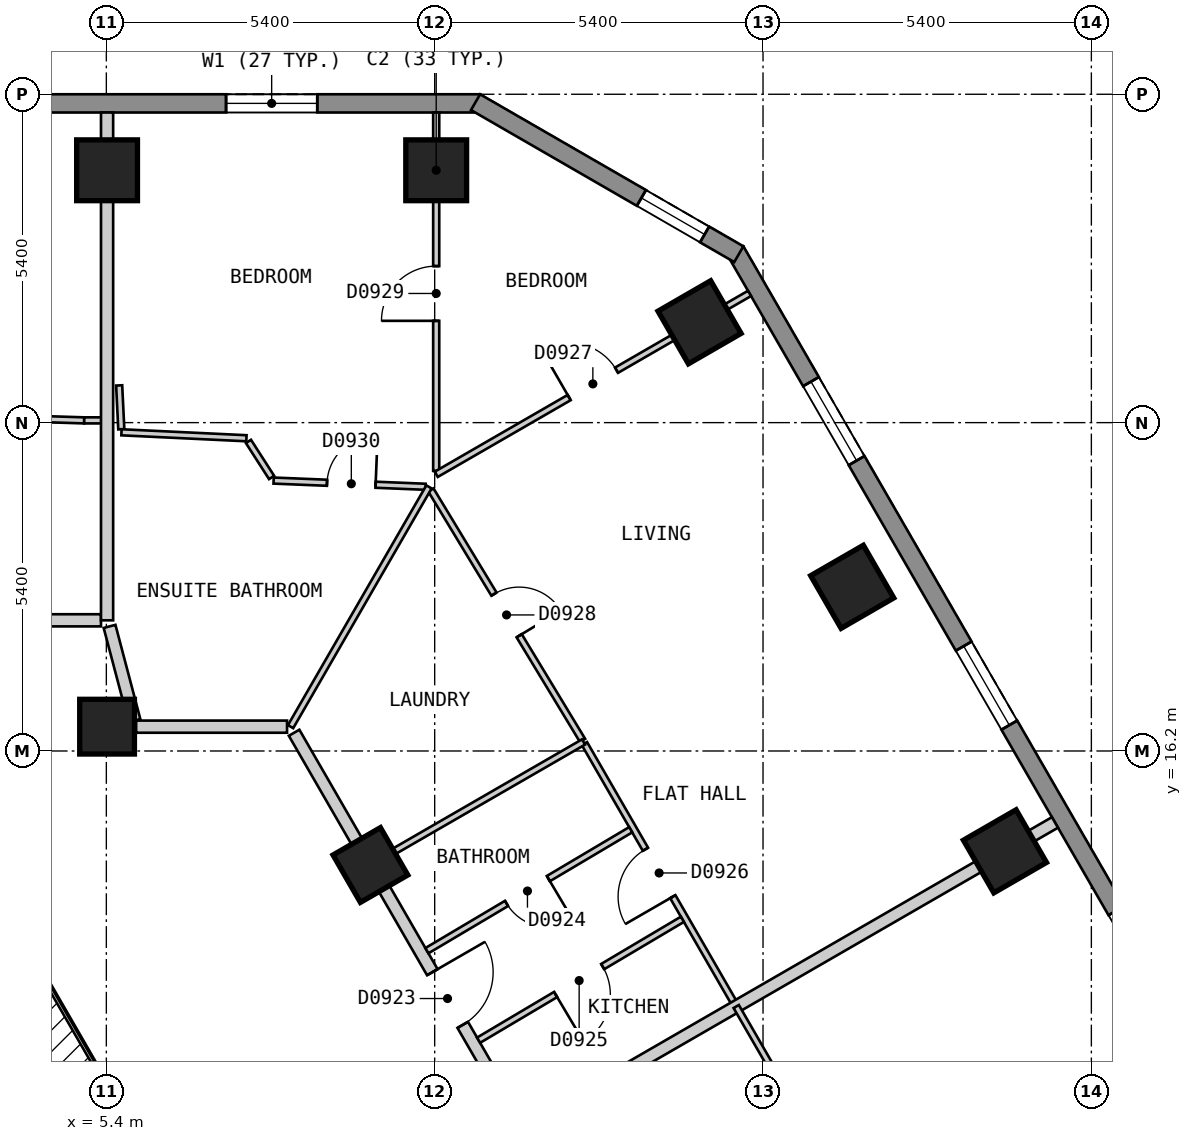
"""IFC4 building model, lengths in metres.
Left out: names, types, materials, properties, quantities, classifications, styles, units other than length and angle.
Written with IfcOpenShell. Run it as: python <this file> out.ifc"""

import sys

from ifc_helpers import new_model, si_unit, direction, frame, frame_2d, origin, origin_2d, place, context, subcontext, project, spatial, polyline, rectangle, outline, extrude, element, fill, save


model = new_model("IFC4")
c1 = context("Model", 3, precision=1e-05, world=origin(), true_north=direction((0.0, 1.0)))
c2 = subcontext(c1, "Body", "Model", "MODEL_VIEW")
j1 = project(units=[si_unit("LENGTHUNIT", "METRE"), si_unit("PLANEANGLEUNIT", "RADIAN")], contexts=[c1])
p1 = place(None, origin())
s1 = spatial("IfcSite", under=j1, at=p1, CompositionType="ELEMENT")
p2 = place(p1, origin())
s2 = spatial("IfcBuilding", under=s1, at=p2, CompositionType="ELEMENT")
p3 = place(p2, frame((0.0, 0.0, 90.0)))
s3 = spatial("IfcBuildingStorey", under=s2, at=p3, CompositionType="ELEMENT", Elevation=90.0)
for number, where, z_axis, x_axis in (
    (1, (10.825, 25.75, 0.0), (0.0, 0.0, 1.0), (-1.0, 0.0, 0.0)),
    (2, (5.412, 25.75, 0.0), (0.0, 0.0, 1.0), (-1.0, 0.0, 0.0)),
    (3, (20.179, 14.55, 0.0), (0.0, 0.0, 1.0), (-0.5, 0.866, 0.0)),
    (4, (17.667, 18.9, 0.0), (0.0, 0.0, 1.0), (-0.5, 0.866, 0.0)),
    (5, (15.156, 23.25, 0.0), (0.0, 0.0, 1.0), (-0.5, 0.866, 0.0)),
):
    element("IfcColumn", number, at=place(p3, frame(where, z_axis=z_axis, x_axis=x_axis)), inside=s3, PredefinedType="COLUMN", context=c2, shape_type="SweptSolid", body=[
        extrude(rectangle(XDim=1.0, YDim=1.0, at=origin_2d()), origin(), (0.0, 0.0, 1.0), 3.0),
    ])
for number, where, z_axis, x_axis in (
    (6, (9.743, 14.325, 0.0), (0.0, 0.0, 1.0), (-0.5, 0.866, 0.0)),
    (7, (5.412, 16.6, 0.0), (0.0, 0.0, 1.0), (-1.0, 0.0, 0.0)),
):
    element("IfcColumn", number, at=place(p3, frame(where, z_axis=z_axis, x_axis=x_axis)), inside=s3, PredefinedType="COLUMN", context=c2, shape_type="SweptSolid", body=[
        extrude(rectangle(XDim=0.9, YDim=0.9, at=origin_2d()), origin(), (0.0, 0.0, 1.0), 3.0),
    ])
p4 = place(p3, frame((11.547, 26.85, 0.0), z_axis=(0.0, 0.0, 1.0), x_axis=(-1.0, 0.0, 0.0)))
e8 = element("IfcWall", 8, at=p4, inside=s3, PredefinedType="SOLIDWALL", context=c2, shape_type="SweptSolid", body=[
    extrude(outline(polyline([(0.0, -0.15), (23.094, -0.15), (23.014, 0.15), (0.08, 0.15), (0.0, -0.15)])), origin(), (0.0, 0.0, 1.0), 2.7),
])
p5 = place(p4, frame((2.678, 0.0, 0.15)))
e9 = element("IfcOpeningElement", 9, at=p5, cuts=e8, PredefinedType="OPENING", context=c2, shape_type="SweptSolid", body=[
    extrude(rectangle(XDim=1.5, YDim=2.1, at=frame_2d((0.75, 1.05))), frame((0.0, 0.16, 0.0), z_axis=(0.0, -1.0, 0.0), x_axis=(1.0, 0.0, 0.0)), (0.0, 0.0, 1.0), 0.32),
])
p6 = place(p4, frame((8.092, 0.0, 0.15)))
e10 = element("IfcOpeningElement", 10, at=p6, cuts=e8, PredefinedType="OPENING", context=c2, shape_type="SweptSolid", body=[
    extrude(rectangle(XDim=1.5, YDim=2.1, at=frame_2d((0.75, 1.05))), frame((0.0, 0.16, 0.0), z_axis=(0.0, -1.0, 0.0), x_axis=(1.0, 0.0, 0.0)), (0.0, 0.0, 1.0), 0.32),
])
p7 = place(p4, frame((13.504, 0.0, 0.15)))
e11 = element("IfcOpeningElement", 11, at=p7, cuts=e8, PredefinedType="OPENING", context=c2, shape_type="SweptSolid", body=[
    extrude(rectangle(XDim=1.5, YDim=2.1, at=frame_2d((0.75, 1.05))), frame((0.0, 0.16, 0.0), z_axis=(0.0, -1.0, 0.0), x_axis=(1.0, 0.0, 0.0)), (0.0, 0.0, 1.0), 0.32),
])
p8 = place(p4, frame((18.917, 0.0, 0.15)))
e12 = element("IfcOpeningElement", 12, at=p8, cuts=e8, PredefinedType="OPENING", context=c2, shape_type="SweptSolid", body=[
    extrude(rectangle(XDim=1.5, YDim=2.1, at=frame_2d((0.75, 1.05))), frame((0.0, 0.16, 0.0), z_axis=(0.0, -1.0, 0.0), x_axis=(1.0, 0.0, 0.0)), (0.0, 0.0, 1.0), 0.32),
])
p9 = place(p3, frame((29.027, 1.425, 0.0), z_axis=(0.0, 0.0, 1.0), x_axis=(-0.500027479704, 0.866009537788, 0.0)))
e13 = element("IfcWall", 13, at=p9, inside=s3, PredefinedType="SOLIDWALL", context=c2, shape_type="SweptSolid", body=[
    extrude(outline(polyline([(0.0, -0.15), (26.559, -0.15), (26.478, 0.15), (0.08, 0.15), (0.0, -0.15)])), origin(), (0.0, 0.0, 1.0), 2.7),
])
p10 = place(p9, frame((2.483, 0.0, 0.15)))
e14 = element("IfcOpeningElement", 14, at=p10, cuts=e13, PredefinedType="OPENING", context=c2, shape_type="SweptSolid", body=[
    extrude(rectangle(XDim=1.5, YDim=2.1, at=frame_2d((0.75, 1.05))), frame((0.0, 0.16, 0.0), z_axis=(0.0, -1.0, 0.0), x_axis=(1.0, 0.0, 0.0)), (0.0, 0.0, 1.0), 0.32),
])
p11 = place(p9, frame((7.506, 0.0, 0.15)))
e15 = element("IfcOpeningElement", 15, at=p11, cuts=e13, PredefinedType="OPENING", context=c2, shape_type="SweptSolid", body=[
    extrude(rectangle(XDim=1.5, YDim=2.1, at=frame_2d((0.75, 1.05))), frame((0.0, 0.16, 0.0), z_axis=(0.0, -1.0, 0.0), x_axis=(1.0, 0.0, 0.0)), (0.0, 0.0, 1.0), 0.32),
])
p12 = place(p9, frame((12.529, 0.0, 0.15)))
e16 = element("IfcOpeningElement", 16, at=p12, cuts=e13, PredefinedType="OPENING", context=c2, shape_type="SweptSolid", body=[
    extrude(rectangle(XDim=1.5, YDim=2.1, at=frame_2d((0.75, 1.05))), frame((0.0, 0.16, 0.0), z_axis=(0.0, -1.0, 0.0), x_axis=(1.0, 0.0, 0.0)), (0.0, 0.0, 1.0), 0.32),
])
p13 = place(p9, frame((17.552, 0.0, 0.15)))
e17 = element("IfcOpeningElement", 17, at=p13, cuts=e13, PredefinedType="OPENING", context=c2, shape_type="SweptSolid", body=[
    extrude(rectangle(XDim=1.5, YDim=2.1, at=frame_2d((0.75, 1.05))), frame((0.0, 0.16, 0.0), z_axis=(0.0, -1.0, 0.0), x_axis=(1.0, 0.0, 0.0)), (0.0, 0.0, 1.0), 0.32),
])
p14 = place(p9, frame((22.575, 0.0, 0.15)))
e18 = element("IfcOpeningElement", 18, at=p14, cuts=e13, PredefinedType="OPENING", context=c2, shape_type="SweptSolid", body=[
    extrude(rectangle(XDim=1.5, YDim=2.1, at=frame_2d((0.75, 1.05))), frame((0.0, 0.16, 0.0), z_axis=(0.0, -1.0, 0.0), x_axis=(1.0, 0.0, 0.0)), (0.0, 0.0, 1.0), 0.32),
])
p15 = place(p3, frame((15.802, 24.37, 0.0), z_axis=(0.0, 0.0, 1.0), x_axis=(-0.866022959057, 0.500004234368, 0.0)))
e19 = element("IfcWall", 19, at=p15, inside=s3, PredefinedType="SOLIDWALL", context=c2, shape_type="SweptSolid", body=[
    extrude(outline(polyline([(0.0, -0.15), (5.0, -0.15), (4.92, 0.15), (0.08, 0.15), (0.0, -0.15)])), origin(), (0.0, 0.0, 1.0), 2.7),
])
p16 = place(p15, frame((0.65, 0.0, 0.15)))
e20 = element("IfcOpeningElement", 20, at=p16, cuts=e19, PredefinedType="OPENING", context=c2, shape_type="SweptSolid", body=[
    extrude(rectangle(XDim=1.2, YDim=2.1, at=frame_2d((0.6, 1.05))), frame((0.0, 0.16, 0.0), z_axis=(0.0, -1.0, 0.0), x_axis=(1.0, 0.0, 0.0)), (0.0, 0.0, 1.0), 0.32),
])
p17 = place(p3, frame((5.453, 18.249, 0.0), z_axis=(0.0, 0.0, 1.0), x_axis=(0.255385747764, -0.966839241983, 0.0)))
e21 = element("IfcWall", 21, at=p17, inside=s3, PredefinedType="PARTITIONING", context=c2, shape_type="SweptSolid", body=[
    extrude(rectangle(XDim=1.602, YDim=0.2, at=frame_2d((0.801, 0.0))), origin(), (0.0, 0.0, 1.0), 2.7),
])
p18 = place(p3, frame((8.488, 16.5, 0.0), z_axis=(0.0, 0.0, 1.0), x_axis=(0.499986836607, -0.86603300354, 0.0)))
e22 = element("IfcWall", 22, at=p18, inside=s3, PredefinedType="PARTITIONING", context=c2, shape_type="SweptSolid", body=[
    extrude(rectangle(XDim=20.09, YDim=0.2, at=frame_2d((10.045, 0.0))), origin(), (0.0, 0.0, 1.0), 2.7),
])
p19 = place(p18, frame((14.569, 0.0, 0.0)))
e23 = element("IfcOpeningElement", 23, at=p19, cuts=e22, PredefinedType="OPENING", context=c2, shape_type="SweptSolid", body=[
    extrude(rectangle(XDim=1.0, YDim=2.1, at=frame_2d((0.5, 1.05))), frame((0.0, 0.11, 0.0), z_axis=(0.0, -1.0, 0.0), x_axis=(1.0, 0.0, 0.0)), (0.0, 0.0, 1.0), 0.22),
])
p20 = place(p18, frame((4.547, 0.0, 0.0)))
e24 = element("IfcOpeningElement", 24, at=p20, cuts=e22, PredefinedType="OPENING", context=c2, shape_type="SweptSolid", body=[
    extrude(rectangle(XDim=1.0, YDim=2.1, at=frame_2d((0.5, 1.05))), frame((0.0, 0.11, 0.0), z_axis=(0.0, -1.0, 0.0), x_axis=(1.0, 0.0, 0.0)), (0.0, 0.0, 1.0), 0.22),
])
p21 = place(p3, frame((5.889, 16.6, 0.0), z_axis=(0.0, 0.0, 1.0), x_axis=(1.0, 0.0, 0.0)))
e25 = element("IfcWall", 25, at=p21, inside=s3, PredefinedType="PARTITIONING", context=c2, shape_type="SweptSolid", body=[
    extrude(rectangle(XDim=2.483, YDim=0.2, at=frame_2d((1.242, 0.0))), origin(), (0.0, 0.0, 1.0), 2.7),
])
p22 = place(p3, frame((1.75, 18.349, 0.0), z_axis=(0.0, 0.0, 1.0), x_axis=(1.0, 0.0, 0.0)))
e26 = element("IfcWall", 26, at=p22, inside=s3, PredefinedType="PARTITIONING", context=c2, shape_type="SweptSolid", body=[
    extrude(rectangle(XDim=3.562, YDim=0.2, at=frame_2d((1.781, 0.0))), origin(), (0.0, 0.0, 1.0), 2.7),
])
p23 = place(p3, frame((7.737, 21.291, 0.0), z_axis=(0.0, 0.0, 1.0), x_axis=(0.540389876456, -0.841414749944, 0.0)))
e27 = element("IfcWall", 27, at=p23, inside=s3, PredefinedType="PARTITIONING", context=c2, shape_type="SweptSolid", body=[
    extrude(rectangle(XDim=0.705, YDim=0.1, at=frame_2d((0.353, 0.0))), origin(), (0.0, 0.0, 1.0), 2.7),
])
p24 = place(p3, frame((10.738, 20.492, 0.0), z_axis=(0.0, 0.0, 1.0), x_axis=(0.518026330534, -0.85536467128, 0.0)))
e28 = element("IfcWall", 28, at=p24, inside=s3, PredefinedType="PARTITIONING", context=c2, shape_type="SweptSolid", body=[
    extrude(rectangle(XDim=4.814, YDim=0.1, at=frame_2d((2.407, 0.0))), origin(), (0.0, 0.0, 1.0), 2.7),
])
p25 = place(p24, frame((2.002, 0.0, 0.0)))
e29 = element("IfcOpeningElement", 29, at=p25, cuts=e28, PredefinedType="OPENING", context=c2, shape_type="SweptSolid", body=[
    extrude(rectangle(XDim=0.8, YDim=2.1, at=frame_2d((0.4, 1.05))), frame((0.0, 0.06, 0.0), z_axis=(0.0, -1.0, 0.0), x_axis=(1.0, 0.0, 0.0)), (0.0, 0.0, 1.0), 0.12),
])
p26 = place(p3, frame((13.263, 16.322, 0.0), z_axis=(0.0, 0.0, 1.0), x_axis=(0.499946798379, -0.866056117576, 0.0)))
e30 = element("IfcWall", 30, at=p26, inside=s3, PredefinedType="PARTITIONING", context=c2, shape_type="SweptSolid", body=[
    extrude(rectangle(XDim=4.993, YDim=0.1, at=frame_2d((2.496, 0.0))), origin(), (0.0, 0.0, 1.0), 2.7),
])
p27 = place(p26, frame((2.007, 0.0, 0.0)))
e31 = element("IfcOpeningElement", 31, at=p27, cuts=e30, PredefinedType="OPENING", context=c2, shape_type="SweptSolid", body=[
    extrude(rectangle(XDim=0.9, YDim=2.1, at=frame_2d((0.45, 1.05))), frame((0.0, 0.06, 0.0), z_axis=(0.0, -1.0, 0.0), x_axis=(1.0, 0.0, 0.0)), (0.0, 0.0, 1.0), 0.12),
])
p28 = place(p3, frame((5.611, 22.212, 0.0), z_axis=(0.0, 0.0, 1.0), x_axis=(0.048368650834, -0.998829551834, 0.0)))
e32 = element("IfcWall", 32, at=p28, inside=s3, PredefinedType="PARTITIONING", context=c2, shape_type="SweptSolid", body=[
    extrude(rectangle(XDim=0.722, YDim=0.1, at=frame_2d((0.361, 0.0))), origin(), (0.0, 0.0, 1.0), 2.7),
])
p29 = place(p3, frame((0.049, 21.792, 0.0), z_axis=(0.0, 0.0, 1.0), x_axis=(0.999517123417, -0.031072817652, 0.0)))
e33 = element("IfcWall", 33, at=p29, inside=s3, PredefinedType="PARTITIONING", context=c2, shape_type="SweptSolid", body=[
    extrude(rectangle(XDim=4.989, YDim=0.1, at=frame_2d((2.495, 0.0))), origin(), (0.0, 0.0, 1.0), 2.7),
])
p30 = place(p3, frame((8.151, 20.647, 0.0), z_axis=(0.0, 0.0, 1.0), x_axis=(0.999167241152, -0.040802257405, 0.0)))
e34 = element("IfcWall", 34, at=p30, inside=s3, PredefinedType="PARTITIONING", context=c2, shape_type="SweptSolid", body=[
    extrude(rectangle(XDim=2.501, YDim=0.1, at=frame_2d((1.25, 0.0))), origin(), (0.0, 0.0, 1.0), 2.7),
])
p31 = place(p30, frame((0.879, 0.0, 0.0)))
e35 = element("IfcOpeningElement", 35, at=p31, cuts=e34, PredefinedType="OPENING", context=c2, shape_type="SweptSolid", body=[
    extrude(rectangle(XDim=0.8, YDim=2.1, at=frame_2d((0.4, 1.05))), frame((0.0, 0.06, 0.0), z_axis=(0.0, -1.0, 0.0), x_axis=(1.0, 0.0, 0.0)), (0.0, 0.0, 1.0), 0.12),
])
p32 = place(p3, frame((5.649, 21.441, 0.0), z_axis=(0.0, 0.0, 1.0), x_axis=(0.998867332207, -0.047582062273, 0.0)))
e36 = element("IfcWall", 36, at=p32, inside=s3, PredefinedType="PARTITIONING", context=c2, shape_type="SweptSolid", body=[
    extrude(rectangle(XDim=2.058, YDim=0.1, at=frame_2d((1.029, 0.0))), origin(), (0.0, 0.0, 1.0), 2.7),
])
p33 = place(p3, frame((5.036, 21.637, 0.0), z_axis=(0.0, 0.0, 1.0), x_axis=(1.0, 0.0, 0.0)))
e37 = element("IfcWall", 37, at=p33, inside=s3, PredefinedType="PARTITIONING", context=c2, shape_type="SweptSolid", body=[
    extrude(rectangle(XDim=0.337, YDim=0.1, at=frame_2d((0.168, 0.0))), origin(), (0.0, 0.0, 1.0), 2.7),
])
p34 = place(p3, frame((8.43, 16.6, 0.0), z_axis=(0.0, 0.0, 1.0), x_axis=(0.499951460778, 0.866053426104, 0.0)))
e38 = element("IfcWall", 38, at=p34, inside=s3, PredefinedType="PARTITIONING", context=c2, shape_type="SweptSolid", body=[
    extrude(rectangle(XDim=4.553, YDim=0.1, at=frame_2d((2.276, 0.0))), origin(), (0.0, 0.0, 1.0), 2.7),
])
p35 = place(p3, frame((10.825, 20.806, 0.0), z_axis=(0.0, 0.0, 1.0), x_axis=(0.0, 1.0, 0.0)))
e39 = element("IfcWall", 39, at=p35, inside=s3, PredefinedType="PARTITIONING", context=c2, shape_type="SweptSolid", body=[
    extrude(rectangle(XDim=5.894, YDim=0.1, at=frame_2d((2.947, 0.0))), origin(), (0.0, 0.0, 1.0), 2.7),
])
p36 = place(p35, frame((2.468, 0.0, 0.0)))
e40 = element("IfcOpeningElement", 40, at=p36, cuts=e39, PredefinedType="OPENING", context=c2, shape_type="SweptSolid", body=[
    extrude(rectangle(XDim=0.9, YDim=2.1, at=frame_2d((0.45, 1.05))), frame((0.0, 0.06, 0.0), z_axis=(0.0, -1.0, 0.0), x_axis=(1.0, 0.0, 0.0)), (0.0, 0.0, 1.0), 0.12),
])
p37 = place(p3, frame((9.83, 14.375, 0.0), z_axis=(0.0, 0.0, 1.0), x_axis=(0.866076396086, 0.499911668341, 0.0)))
e41 = element("IfcWall", 41, at=p37, inside=s3, PredefinedType="PARTITIONING", context=c2, shape_type="SweptSolid", body=[
    extrude(rectangle(XDim=3.947, YDim=0.1, at=frame_2d((1.973, 0.0))), origin(), (0.0, 0.0, 1.0), 2.7),
])
p38 = place(p3, frame((10.826, 20.75, 0.0), z_axis=(0.0, 0.0, 1.0), x_axis=(0.865986712877, 0.50006700863, 0.0)))
e42 = element("IfcWall", 42, at=p38, inside=s3, PredefinedType="PARTITIONING", context=c2, shape_type="SweptSolid", body=[
    extrude(rectangle(XDim=5.949, YDim=0.1, at=frame_2d((2.975, 0.0))), origin(), (0.0, 0.0, 1.0), 2.7),
])
p39 = place(p38, frame((2.524, 0.0, 0.0)))
e43 = element("IfcOpeningElement", 43, at=p39, cuts=e42, PredefinedType="OPENING", context=c2, shape_type="SweptSolid", body=[
    extrude(rectangle(XDim=0.9, YDim=2.1, at=frame_2d((0.45, 1.05))), frame((0.0, 0.06, 0.0), z_axis=(0.0, -1.0, 0.0), x_axis=(1.0, 0.0, 0.0)), (0.0, 0.0, 1.0), 0.12),
])
p40 = place(p3, frame((11.522, 11.444, 0.0), z_axis=(0.0, 0.0, 1.0), x_axis=(0.860134781641, 0.510066816615, 0.0)))
e44 = element("IfcWall", 44, at=p40, inside=s3, PredefinedType="PARTITIONING", context=c2, shape_type="SweptSolid", body=[
    extrude(rectangle(XDim=3.897, YDim=0.1, at=frame_2d((1.949, 0.0))), origin(), (0.0, 0.0, 1.0), 2.7),
])
p41 = place(p40, frame((1.473, 0.0, 0.0)))
e45 = element("IfcOpeningElement", 45, at=p41, cuts=e44, PredefinedType="OPENING", context=c2, shape_type="SweptSolid", body=[
    extrude(rectangle(XDim=0.9, YDim=2.1, at=frame_2d((0.45, 1.05))), frame((0.0, 0.06, 0.0), z_axis=(0.0, -1.0, 0.0), x_axis=(1.0, 0.0, 0.0)), (0.0, 0.0, 1.0), 0.12),
])
p42 = place(p3, frame((10.672, 12.916, 0.0), z_axis=(0.0, 0.0, 1.0), x_axis=(0.859981037235, 0.510325989537, 0.0)))
e46 = element("IfcWall", 46, at=p42, inside=s3, PredefinedType="PARTITIONING", context=c2, shape_type="SweptSolid", body=[
    extrude(rectangle(XDim=3.897, YDim=0.1, at=frame_2d((1.949, 0.0))), origin(), (0.0, 0.0, 1.0), 2.7),
])
p43 = place(p42, frame((1.523, 0.0, 0.0)))
e47 = element("IfcOpeningElement", 47, at=p43, cuts=e46, PredefinedType="OPENING", context=c2, shape_type="SweptSolid", body=[
    extrude(rectangle(XDim=0.8, YDim=2.1, at=frame_2d((0.4, 1.05))), frame((0.0, 0.06, 0.0), z_axis=(0.0, -1.0, 0.0), x_axis=(1.0, 0.0, 0.0)), (0.0, 0.0, 1.0), 0.12),
])
p44 = place(p3, frame((5.412, 18.349, 0.0), z_axis=(0.0, 0.0, 1.0), x_axis=(0.0, 1.0, 0.0)))
e48 = element("IfcWall", 48, at=p44, inside=s3, PredefinedType="PARTITIONING", context=c2, shape_type="SweptSolid", body=[
    extrude(rectangle(XDim=8.351, YDim=0.2, at=frame_2d((4.175, 0.0))), origin(), (0.0, 0.0, 1.0), 2.7),
])
p45 = place(p3, frame((12.342, 10.025, 0.0), z_axis=(0.0, 0.0, 1.0), x_axis=(0.865992435864, 0.500057097767, 0.0)))
e49 = element("IfcWall", 49, at=p45, inside=s3, PredefinedType="PARTITIONING", context=c2, shape_type="SweptSolid", body=[
    extrude(rectangle(XDim=9.999, YDim=0.2, at=frame_2d((5.0, 0.0))), origin(), (0.0, 0.0, 1.0), 2.7),
])
p46 = place(p3, frame((15.759, 11.998, 0.0), z_axis=(0.0, 0.0, 1.0), x_axis=(0.500068444113, -0.865985883951, 0.0)))
e50 = element("IfcWall", 50, at=p46, inside=s3, PredefinedType="PARTITIONING", context=c2, shape_type="SweptSolid", body=[
    extrude(rectangle(XDim=9.997, YDim=0.1, at=frame_2d((4.998, 0.0))), origin(), (0.0, 0.0, 1.0), 2.7),
])
p47 = place(p46, frame((7.074, 0.0, 0.0)))
e51 = element("IfcOpeningElement", 51, at=p47, cuts=e50, PredefinedType="OPENING", context=c2, shape_type="SweptSolid", body=[
    extrude(rectangle(XDim=0.9, YDim=2.1, at=frame_2d((0.45, 1.05))), frame((0.0, 0.06, 0.0), z_axis=(0.0, -1.0, 0.0), x_axis=(1.0, 0.0, 0.0)), (0.0, 0.0, 1.0), 0.12),
])
p48 = place(p5, origin())
e52 = element("IfcWindow", 52, at=p48, inside=s3, PartitioningType="SINGLE_PANEL", PredefinedType="WINDOW", context=c2, shape_type="SweptSolid", body=[
    extrude(rectangle(XDim=1.5, YDim=2.1, at=frame_2d((0.75, 1.05))), frame((0.0, 0.03, 0.0), z_axis=(0.0, -1.0, 0.0), x_axis=(1.0, 0.0, 0.0)), (0.0, 0.0, 1.0), 0.06),
])
fill(e9, e52)
p49 = place(p13, origin())
e53 = element("IfcWindow", 53, at=p49, inside=s3, PartitioningType="SINGLE_PANEL", PredefinedType="WINDOW", context=c2, shape_type="SweptSolid", body=[
    extrude(rectangle(XDim=1.5, YDim=2.1, at=frame_2d((0.75, 1.05))), frame((0.0, 0.03, 0.0), z_axis=(0.0, -1.0, 0.0), x_axis=(1.0, 0.0, 0.0)), (0.0, 0.0, 1.0), 0.06),
])
fill(e17, e53)
p50 = place(p14, origin())
e54 = element("IfcWindow", 54, at=p50, inside=s3, PartitioningType="SINGLE_PANEL", PredefinedType="WINDOW", context=c2, shape_type="SweptSolid", body=[
    extrude(rectangle(XDim=1.5, YDim=2.1, at=frame_2d((0.75, 1.05))), frame((0.0, 0.03, 0.0), z_axis=(0.0, -1.0, 0.0), x_axis=(1.0, 0.0, 0.0)), (0.0, 0.0, 1.0), 0.06),
])
fill(e18, e54)
p51 = place(p16, origin())
e55 = element("IfcWindow", 55, at=p51, inside=s3, PartitioningType="SINGLE_PANEL", PredefinedType="WINDOW", context=c2, shape_type="SweptSolid", body=[
    extrude(rectangle(XDim=1.2, YDim=2.1, at=frame_2d((0.6, 1.05))), frame((0.0, 0.03, 0.0), z_axis=(0.0, -1.0, 0.0), x_axis=(1.0, 0.0, 0.0)), (0.0, 0.0, 1.0), 0.06),
])
fill(e20, e55)
p52 = place(p20, origin())
e56 = element("IfcDoor", 56, at=p52, inside=s3, OperationType="SINGLE_SWING_LEFT", PredefinedType="DOOR", context=c2, shape_type="SweptSolid", body=[
    extrude(rectangle(XDim=1.0, YDim=2.1, at=frame_2d((0.5, 1.05))), frame((0.0, 0.025, 0.0), z_axis=(0.0, -1.0, 0.0), x_axis=(1.0, 0.0, 0.0)), (0.0, 0.0, 1.0), 0.05),
])
fill(e24, e56)
p53 = place(p43, origin())
e57 = element("IfcDoor", 57, at=p53, inside=s3, OperationType="SINGLE_SWING_RIGHT", PredefinedType="DOOR", context=c2, shape_type="SweptSolid", body=[
    extrude(rectangle(XDim=0.8, YDim=2.1, at=frame_2d((0.4, 1.05))), frame((0.0, 0.025, 0.0), z_axis=(0.0, -1.0, 0.0), x_axis=(1.0, 0.0, 0.0)), (0.0, 0.0, 1.0), 0.05),
])
fill(e47, e57)
p54 = place(p41, origin())
e58 = element("IfcDoor", 58, at=p54, inside=s3, OperationType="SINGLE_SWING_LEFT", PredefinedType="DOOR", context=c2, shape_type="SweptSolid", body=[
    extrude(rectangle(XDim=0.9, YDim=2.1, at=frame_2d((0.45, 1.05))), frame((0.0, 0.025, 0.0), z_axis=(0.0, -1.0, 0.0), x_axis=(1.0, 0.0, 0.0)), (0.0, 0.0, 1.0), 0.05),
])
fill(e45, e58)
p55 = place(p27, origin())
e59 = element("IfcDoor", 59, at=p55, inside=s3, OperationType="SINGLE_SWING_RIGHT", PredefinedType="DOOR", context=c2, shape_type="SweptSolid", body=[
    extrude(rectangle(XDim=0.9, YDim=2.1, at=frame_2d((0.45, 1.05))), frame((0.0, 0.025, 0.0), z_axis=(0.0, -1.0, 0.0), x_axis=(1.0, 0.0, 0.0)), (0.0, 0.0, 1.0), 0.05),
])
fill(e31, e59)
p56 = place(p39, origin())
e60 = element("IfcDoor", 60, at=p56, inside=s3, OperationType="SINGLE_SWING_LEFT", PredefinedType="DOOR", context=c2, shape_type="SweptSolid", body=[
    extrude(rectangle(XDim=0.9, YDim=2.1, at=frame_2d((0.45, 1.05))), frame((0.0, 0.025, 0.0), z_axis=(0.0, -1.0, 0.0), x_axis=(1.0, 0.0, 0.0)), (0.0, 0.0, 1.0), 0.05),
])
fill(e43, e60)
p57 = place(p25, origin())
e61 = element("IfcDoor", 61, at=p57, inside=s3, OperationType="SINGLE_SWING_RIGHT", PredefinedType="DOOR", context=c2, shape_type="SweptSolid", body=[
    extrude(rectangle(XDim=0.8, YDim=2.1, at=frame_2d((0.4, 1.05))), frame((0.0, 0.025, 0.0), z_axis=(0.0, -1.0, 0.0), x_axis=(1.0, 0.0, 0.0)), (0.0, 0.0, 1.0), 0.05),
])
fill(e29, e61)
p58 = place(p36, origin())
e62 = element("IfcDoor", 62, at=p58, inside=s3, OperationType="SINGLE_SWING_LEFT", PredefinedType="DOOR", context=c2, shape_type="SweptSolid", body=[
    extrude(rectangle(XDim=0.9, YDim=2.1, at=frame_2d((0.45, 1.05))), frame((0.0, 0.025, 0.0), z_axis=(0.0, -1.0, 0.0), x_axis=(1.0, 0.0, 0.0)), (0.0, 0.0, 1.0), 0.05),
])
fill(e40, e62)
p59 = place(p31, origin())
e63 = element("IfcDoor", 63, at=p59, inside=s3, OperationType="SINGLE_SWING_RIGHT", PredefinedType="DOOR", context=c2, shape_type="SweptSolid", body=[
    extrude(rectangle(XDim=0.8, YDim=2.1, at=frame_2d((0.4, 1.05))), frame((0.0, 0.025, 0.0), z_axis=(0.0, -1.0, 0.0), x_axis=(1.0, 0.0, 0.0)), (0.0, 0.0, 1.0), 0.05),
])
fill(e35, e63)
save(model, sys.argv[1])
